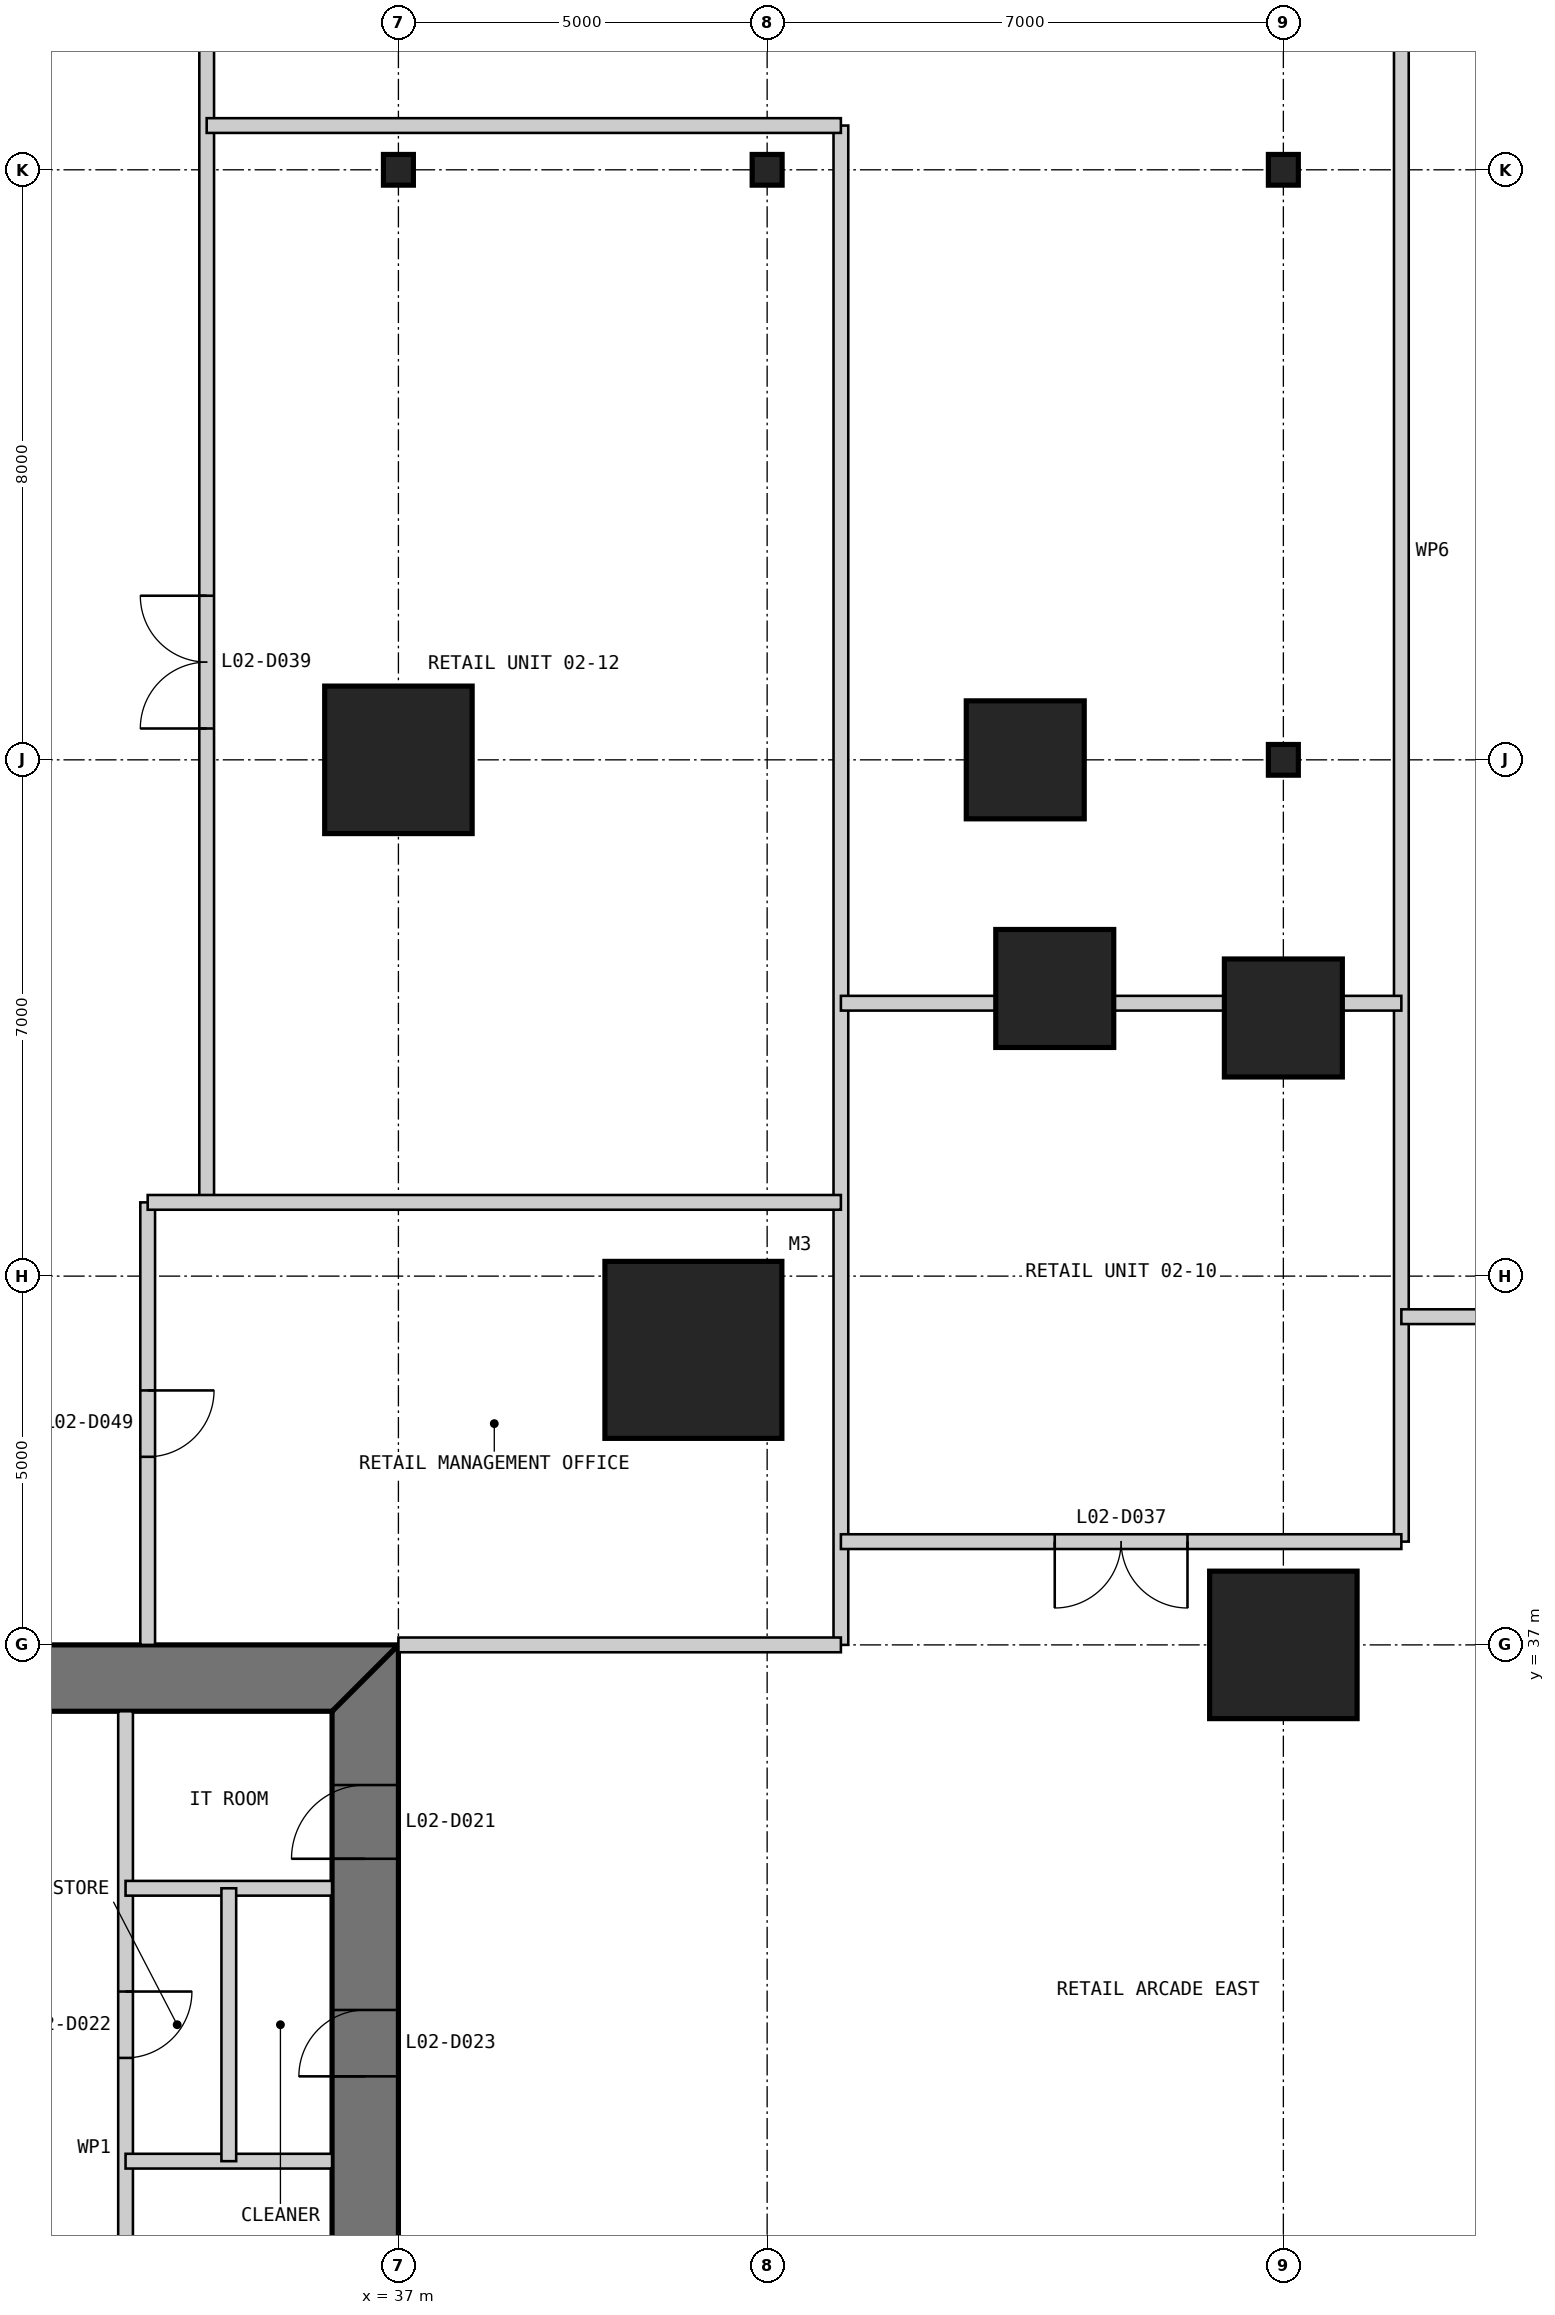
"""IFC4 building model, lengths in metres.
Left out: names, types, materials, properties, quantities, classifications, styles, units other than length and angle.
Written with IfcOpenShell. Run it as: python <this file> out.ifc"""

import sys

from ifc_helpers import new_model, si_unit, direction, frame, frame_2d, origin, origin_2d, place, context, subcontext, project, spatial, polyline, rectangle, i_section, outline, extrude, element, fill, save


model = new_model("IFC4")
c1 = context("Model", 3, precision=1e-05, world=origin(), true_north=direction((0.0, 1.0)))
c2 = subcontext(c1, "Body", "Model", "MODEL_VIEW")
j1 = project(units=[si_unit("LENGTHUNIT", "METRE"), si_unit("PLANEANGLEUNIT", "RADIAN")], contexts=[c1])
p1 = place(None, origin())
s1 = spatial("IfcSite", under=j1, at=p1, CompositionType="ELEMENT")
p2 = place(p1, origin())
s2 = spatial("IfcBuilding", under=s1, at=p2, CompositionType="ELEMENT")
p3 = place(p2, frame((0.0, 0.0, 11.8)))
s3 = spatial("IfcBuildingStorey", under=s2, at=p3, CompositionType="ELEMENT", Elevation=11.8)
p4 = place(p3, frame((41.0, 41.0, 0.0), z_axis=(0.0, 0.0, 1.0), x_axis=(1.0, 0.0, 0.0)))
e1 = element("IfcColumn", 1, at=p4, inside=s3, PredefinedType="COLUMN", context=c2, shape_type="SweptSolid", body=[
    extrude(rectangle(XDim=2.4, YDim=2.4, at=origin_2d()), origin(), (0.0, 0.0, 1.0), 4.8),
])
p5 = place(p3, frame((49.0, 37.0, 0.0), z_axis=(0.0, 0.0, 1.0), x_axis=(1.0, 0.0, 0.0)))
e2 = element("IfcColumn", 2, at=p5, inside=s3, PredefinedType="COLUMN", context=c2, shape_type="SweptSolid", body=[
    extrude(rectangle(XDim=2.0, YDim=2.0, at=origin_2d()), origin(), (0.0, 0.0, 1.0), 4.8),
])
for number, where, z_axis, x_axis in (
    (3, (49.0, 45.5, 0.0), (0.0, 0.0, 1.0), (1.0, 0.0, 0.0)),
    (4, (45.9, 45.9, 0.0), (0.0, 0.0, 1.0), (1.0, 0.0, 0.0)),
    (5, (45.5, 49.0, 0.0), (0.0, 0.0, 1.0), (1.0, 0.0, 0.0)),
):
    element("IfcColumn", number, at=place(p3, frame(where, z_axis=z_axis, x_axis=x_axis)), inside=s3, PredefinedType="COLUMN", context=c2, shape_type="SweptSolid", body=[
        extrude(rectangle(XDim=1.6, YDim=1.6, at=origin_2d()), origin(), (0.0, 0.0, 1.0), 4.8),
    ])
p6 = place(p3, frame((37.0, 49.0, 0.0), z_axis=(0.0, 0.0, 1.0), x_axis=(1.0, 0.0, 0.0)))
e6 = element("IfcColumn", 6, at=p6, inside=s3, PredefinedType="COLUMN", context=c2, shape_type="SweptSolid", body=[
    extrude(rectangle(XDim=2.0, YDim=2.0, at=origin_2d()), origin(), (0.0, 0.0, 1.0), 4.8),
])
for number, where, z_axis, x_axis in (
    (7, (37.0, 57.0, 0.0), (0.0, 0.0, 1.0), (1.0, 0.0, 0.0)),
    (8, (42.0, 57.0, 0.0), (0.0, 0.0, 1.0), (1.0, 0.0, 0.0)),
    (9, (49.0, 49.0, 0.0), (0.0, 0.0, 1.0), (1.0, 0.0, 0.0)),
    (10, (49.0, 57.0, 0.0), (0.0, 0.0, 1.0), (1.0, 0.0, 0.0)),
):
    element("IfcColumn", number, at=place(p3, frame(where, z_axis=z_axis, x_axis=x_axis)), inside=s3, PredefinedType="COLUMN", context=c2, shape_type="SweptSolid", body=[
        extrude(i_section(OverallWidth=0.406, OverallDepth=0.417, WebThickness=0.03, FlangeThickness=0.048, at=origin_2d()), origin(), (0.0, 0.0, 1.0), 4.8),
    ])
p7 = place(p3, frame((36.55, 13.9, 0.0), z_axis=(0.0, 0.0, 1.0), x_axis=(0.0, 1.0, 0.0)))
e11 = element("IfcWall", 11, at=p7, inside=s3, PredefinedType="SHEAR", context=c2, shape_type="SweptSolid", body=[
    extrude(outline(polyline([(-0.9, -0.45), (23.1, -0.45), (22.2, 0.45), (0.0, 0.45), (-0.9, -0.45)])), origin(), (0.0, 0.0, 1.0), 4.8),
])
p8 = place(p7, frame((20.2, 0.0, 0.0)))
e12 = element("IfcOpeningElement", 12, at=p8, cuts=e11, PredefinedType="OPENING", context=c2, shape_type="SweptSolid", body=[
    extrude(rectangle(XDim=1.0, YDim=2.2, at=frame_2d((0.5, 1.1))), frame((0.0, 0.46, 0.0), z_axis=(0.0, -1.0, 0.0), x_axis=(1.0, 0.0, 0.0)), (0.0, 0.0, 1.0), 0.92),
])
p9 = place(p7, frame((17.25, 0.0, 0.0)))
e13 = element("IfcOpeningElement", 13, at=p9, cuts=e11, PredefinedType="OPENING", context=c2, shape_type="SweptSolid", body=[
    extrude(rectangle(XDim=0.9, YDim=2.2, at=frame_2d((0.45, 1.1))), frame((0.0, 0.46, 0.0), z_axis=(0.0, -1.0, 0.0), x_axis=(1.0, 0.0, 0.0)), (0.0, 0.0, 1.0), 0.92),
])
p10 = place(p3, frame((37.0, 36.55, 0.0), z_axis=(0.0, 0.0, 1.0), x_axis=(-1.0, 0.0, 0.0)))
e14 = element("IfcWall", 14, at=p10, inside=s3, PredefinedType="SHEAR", context=c2, shape_type="SweptSolid", body=[
    extrude(outline(polyline([(0.0, -0.45), (24.0, -0.45), (23.1, 0.45), (0.9, 0.45), (0.0, -0.45)])), origin(), (0.0, 0.0, 1.0), 4.8),
])
p11 = place(p10, frame((4.9, 0.0, 0.0)))
e15 = element("IfcOpeningElement", 15, at=p11, cuts=e14, PredefinedType="OPENING", context=c2, shape_type="SweptSolid", body=[
    extrude(rectangle(XDim=1.0, YDim=2.2, at=frame_2d((0.5, 1.1))), frame((0.0, 0.46, 0.0), z_axis=(0.0, -1.0, 0.0), x_axis=(1.0, 0.0, 0.0)), (0.0, 0.0, 1.0), 0.92),
])
p12 = place(p10, frame((8.9, 0.0, 0.0)))
e16 = element("IfcOpeningElement", 16, at=p12, cuts=e14, PredefinedType="OPENING", context=c2, shape_type="SweptSolid", body=[
    extrude(rectangle(XDim=1.1, YDim=2.2, at=frame_2d((0.55, 1.1))), frame((0.0, 0.46, 0.0), z_axis=(0.0, -1.0, 0.0), x_axis=(1.0, 0.0, 0.0)), (0.0, 0.0, 1.0), 0.92),
])
p13 = place(p10, frame((15.05, 0.0, 0.0)))
e17 = element("IfcOpeningElement", 17, at=p13, cuts=e14, PredefinedType="OPENING", context=c2, shape_type="SweptSolid", body=[
    extrude(rectangle(XDim=0.9, YDim=2.2, at=frame_2d((0.45, 1.1))), frame((0.0, 0.46, 0.0), z_axis=(0.0, -1.0, 0.0), x_axis=(1.0, 0.0, 0.0)), (0.0, 0.0, 1.0), 0.92),
])
p14 = place(p10, frame((17.9, 0.0, 0.0)))
e18 = element("IfcOpeningElement", 18, at=p14, cuts=e14, PredefinedType="OPENING", context=c2, shape_type="SweptSolid", body=[
    extrude(rectangle(XDim=1.0, YDim=2.2, at=frame_2d((0.5, 1.1))), frame((0.0, 0.46, 0.0), z_axis=(0.0, -1.0, 0.0), x_axis=(1.0, 0.0, 0.0)), (0.0, 0.0, 1.0), 0.92),
])
p15 = place(p10, frame((21.4, 0.0, 0.0)))
e19 = element("IfcOpeningElement", 19, at=p15, cuts=e14, PredefinedType="OPENING", context=c2, shape_type="SweptSolid", body=[
    extrude(rectangle(XDim=1.0, YDim=2.2, at=frame_2d((0.5, 1.1))), frame((0.0, 0.46, 0.0), z_axis=(0.0, -1.0, 0.0), x_axis=(1.0, 0.0, 0.0)), (0.0, 0.0, 1.0), 0.92),
])
p16 = place(p3, frame((33.3, 36.1, 0.0), z_axis=(0.0, 0.0, 1.0), x_axis=(0.0, -1.0, 0.0)))
e20 = element("IfcWall", 20, at=p16, inside=s3, PredefinedType="PARTITIONING", context=c2, shape_type="SweptSolid", body=[
    extrude(rectangle(XDim=16.1, YDim=0.2, at=frame_2d((8.05, 0.0))), origin(), (0.0, 0.0, 1.0), 4.6),
])
p17 = place(p16, frame((3.8, 0.0, 0.0)))
e21 = element("IfcOpeningElement", 21, at=p17, cuts=e20, PredefinedType="OPENING", context=c2, shape_type="SweptSolid", body=[
    extrude(rectangle(XDim=0.9, YDim=2.2, at=frame_2d((0.45, 1.1))), frame((0.0, 0.11, 0.0), z_axis=(0.0, -1.0, 0.0), x_axis=(1.0, 0.0, 0.0)), (0.0, 0.0, 1.0), 0.22),
])
for number, where, z_axis, x_axis in (
    (22, (36.1, 30.0, 0.0), (0.0, 0.0, 1.0), (-1.0, 0.0, 0.0)),
    (23, (36.1, 33.7, 0.0), (0.0, 0.0, 1.0), (-1.0, 0.0, 0.0)),
):
    element("IfcWall", number, at=place(p3, frame(where, z_axis=z_axis, x_axis=x_axis)), inside=s3, PredefinedType="PARTITIONING", context=c2, shape_type="SweptSolid", body=[
        extrude(rectangle(XDim=2.8, YDim=0.2, at=frame_2d((1.4, 0.0))), origin(), (0.0, 0.0, 1.0), 4.6),
    ])
p18 = place(p3, frame((34.7, 33.7, 0.0), z_axis=(0.0, 0.0, 1.0), x_axis=(0.0, -1.0, 0.0)))
e24 = element("IfcWall", 24, at=p18, inside=s3, PredefinedType="PARTITIONING", context=c2, shape_type="SweptSolid", body=[
    extrude(rectangle(XDim=3.7, YDim=0.2, at=frame_2d((1.85, 0.0))), origin(), (0.0, 0.0, 1.0), 4.6),
])
p19 = place(p3, frame((33.6, 37.0, 0.0), z_axis=(0.0, 0.0, 1.0), x_axis=(0.0, 1.0, 0.0)))
e25 = element("IfcWall", 25, at=p19, inside=s3, PredefinedType="PARTITIONING", context=c2, shape_type="SweptSolid", body=[
    extrude(rectangle(XDim=6.0, YDim=0.2, at=frame_2d((3.0, 0.0))), origin(), (0.0, 0.0, 1.0), 4.5),
])
p20 = place(p19, frame((2.55, 0.0, 0.0)))
e26 = element("IfcOpeningElement", 26, at=p20, cuts=e25, PredefinedType="OPENING", context=c2, shape_type="SweptSolid", body=[
    extrude(rectangle(XDim=0.9, YDim=2.2, at=frame_2d((0.45, 1.1))), frame((0.0, 0.11, 0.0), z_axis=(0.0, -1.0, 0.0), x_axis=(1.0, 0.0, 0.0)), (0.0, 0.0, 1.0), 0.22),
])
p21 = place(p3, frame((34.4, 43.0, 0.0), z_axis=(0.0, 0.0, 1.0), x_axis=(0.0, 1.0, 0.0)))
e27 = element("IfcWall", 27, at=p21, inside=s3, PredefinedType="PARTITIONING", context=c2, shape_type="SweptSolid", body=[
    extrude(rectangle(XDim=22.25, YDim=0.2, at=frame_2d((11.125, 0.0))), origin(), (0.0, 0.0, 1.0), 4.5),
])
p22 = place(p21, frame((6.425, 0.0, 0.0)))
e28 = element("IfcOpeningElement", 28, at=p22, cuts=e27, PredefinedType="OPENING", context=c2, shape_type="SweptSolid", body=[
    extrude(rectangle(XDim=1.8, YDim=2.4, at=frame_2d((0.9, 1.2))), frame((0.0, 0.11, 0.0), z_axis=(0.0, -1.0, 0.0), x_axis=(1.0, 0.0, 0.0)), (0.0, 0.0, 1.0), 0.22),
])
p23 = place(p21, frame((17.5, 0.0, 0.0)))
e29 = element("IfcOpeningElement", 29, at=p23, cuts=e27, PredefinedType="OPENING", context=c2, shape_type="SweptSolid", body=[
    extrude(rectangle(XDim=1.8, YDim=2.4, at=frame_2d((0.9, 1.2))), frame((0.0, 0.11, 0.0), z_axis=(0.0, -1.0, 0.0), x_axis=(1.0, 0.0, 0.0)), (0.0, 0.0, 1.0), 0.22),
])
p24 = place(p3, frame((43.0, 37.0, 0.0), z_axis=(0.0, 0.0, 1.0), x_axis=(0.0, 1.0, 0.0)))
e30 = element("IfcWall", 30, at=p24, inside=s3, PredefinedType="PARTITIONING", context=c2, shape_type="SweptSolid", body=[
    extrude(rectangle(XDim=20.6, YDim=0.2, at=frame_2d((10.3, 0.0))), origin(), (0.0, 0.0, 1.0), 4.5),
])
p25 = place(p3, frame((50.6, 38.4, 0.0), z_axis=(0.0, 0.0, 1.0), x_axis=(0.0, 1.0, 0.0)))
e31 = element("IfcWall", 31, at=p25, inside=s3, PredefinedType="PARTITIONING", context=c2, shape_type="SweptSolid", body=[
    extrude(rectangle(XDim=26.85, YDim=0.2, at=frame_2d((13.425, 0.0))), origin(), (0.0, 0.0, 1.0), 4.5),
])
p26 = place(p3, frame((37.0, 37.0, 0.0), z_axis=(0.0, 0.0, 1.0), x_axis=(1.0, 0.0, 0.0)))
e32 = element("IfcWall", 32, at=p26, inside=s3, PredefinedType="PARTITIONING", context=c2, shape_type="SweptSolid", body=[
    extrude(rectangle(XDim=6.0, YDim=0.2, at=frame_2d((3.0, 0.0))), origin(), (0.0, 0.0, 1.0), 3.653),
])
p27 = place(p3, frame((43.0, 38.4, 0.0), z_axis=(0.0, 0.0, 1.0), x_axis=(1.0, 0.0, 0.0)))
e33 = element("IfcWall", 33, at=p27, inside=s3, PredefinedType="PARTITIONING", context=c2, shape_type="SweptSolid", body=[
    extrude(rectangle(XDim=7.6, YDim=0.2, at=frame_2d((3.8, 0.0))), origin(), (0.0, 0.0, 1.0), 4.5),
])
p28 = place(p27, frame((2.9, 0.0, 0.0)))
e34 = element("IfcOpeningElement", 34, at=p28, cuts=e33, PredefinedType="OPENING", context=c2, shape_type="SweptSolid", body=[
    extrude(rectangle(XDim=1.8, YDim=2.4, at=frame_2d((0.9, 1.2))), frame((0.0, 0.11, 0.0), z_axis=(0.0, -1.0, 0.0), x_axis=(1.0, 0.0, 0.0)), (0.0, 0.0, 1.0), 0.22),
])
p29 = place(p3, frame((50.6, 41.45, 0.0), z_axis=(0.0, 0.0, 1.0), x_axis=(1.0, 0.0, 0.0)))
e35 = element("IfcWall", 35, at=p29, inside=s3, PredefinedType="PARTITIONING", context=c2, shape_type="SweptSolid", body=[
    extrude(rectangle(XDim=6.65, YDim=0.2, at=frame_2d((3.325, 0.0))), origin(), (0.0, 0.0, 1.0), 4.5),
])
p30 = place(p29, frame((2.425, 0.0, 0.0)))
e36 = element("IfcOpeningElement", 36, at=p30, cuts=e35, PredefinedType="OPENING", context=c2, shape_type="SweptSolid", body=[
    extrude(rectangle(XDim=1.8, YDim=2.4, at=frame_2d((0.9, 1.2))), frame((0.0, 0.11, 0.0), z_axis=(0.0, -1.0, 0.0), x_axis=(1.0, 0.0, 0.0)), (0.0, 0.0, 1.0), 0.22),
])
p31 = place(p3, frame((33.6, 43.0, 0.0), z_axis=(0.0, 0.0, 1.0), x_axis=(1.0, 0.0, 0.0)))
e37 = element("IfcWall", 37, at=p31, inside=s3, PredefinedType="PARTITIONING", context=c2, shape_type="SweptSolid", body=[
    extrude(rectangle(XDim=9.4, YDim=0.2, at=frame_2d((4.7, 0.0))), origin(), (0.0, 0.0, 1.0), 4.5),
])
p32 = place(p3, frame((43.0, 45.7, 0.0), z_axis=(0.0, 0.0, 1.0), x_axis=(1.0, 0.0, 0.0)))
e38 = element("IfcWall", 38, at=p32, inside=s3, PredefinedType="PARTITIONING", context=c2, shape_type="SweptSolid", body=[
    extrude(rectangle(XDim=2.1, YDim=0.2, at=frame_2d((1.05, 0.0))), origin(), (0.0, 0.0, 1.0), 4.5),
])
p33 = place(p3, frame((46.7, 45.7, 0.0), z_axis=(0.0, 0.0, 1.0), x_axis=(1.0, 0.0, 0.0)))
e39 = element("IfcWall", 39, at=p33, inside=s3, PredefinedType="PARTITIONING", context=c2, shape_type="SweptSolid", body=[
    extrude(rectangle(XDim=1.5, YDim=0.2, at=frame_2d((0.75, 0.0))), origin(), (0.0, 0.0, 1.0), 3.65),
])
p34 = place(p3, frame((49.8, 45.7, 0.0), z_axis=(0.0, 0.0, 1.0), x_axis=(1.0, 0.0, 0.0)))
e40 = element("IfcWall", 40, at=p34, inside=s3, PredefinedType="PARTITIONING", context=c2, shape_type="SweptSolid", body=[
    extrude(rectangle(XDim=0.8, YDim=0.2, at=frame_2d((0.4, 0.0))), origin(), (0.0, 0.0, 1.0), 4.5),
])
p35 = place(p3, frame((34.4, 57.6, 0.0), z_axis=(0.0, 0.0, 1.0), x_axis=(1.0, 0.0, 0.0)))
e41 = element("IfcWall", 41, at=p35, inside=s3, PredefinedType="PARTITIONING", context=c2, shape_type="SweptSolid", body=[
    extrude(rectangle(XDim=8.6, YDim=0.2, at=frame_2d((4.3, 0.0))), origin(), (0.0, 0.0, 1.0), 4.5),
])
p36 = place(p8, origin())
e42 = element("IfcDoor", 42, at=p36, inside=s3, OperationType="SINGLE_SWING_LEFT", PredefinedType="DOOR", context=c2, shape_type="SweptSolid", body=[
    extrude(rectangle(XDim=1.0, YDim=2.2, at=frame_2d((0.5, 1.1))), frame((0.0, 0.025, 0.0), z_axis=(0.0, -1.0, 0.0), x_axis=(1.0, 0.0, 0.0)), (0.0, 0.0, 1.0), 0.05),
    extrude(outline(polyline([(0.0, 0.0), (0.04, 0.0), (0.04, 2.16), (0.96, 2.16), (0.96, 0.0), (1.0, 0.0), (1.0, 2.2), (0.0, 2.2), (0.0, 0.0)])), frame((0.0, 0.3, 0.0), z_axis=(0.0, -1.0, 0.0), x_axis=(1.0, 0.0, 0.0)), (0.0, 0.0, 1.0), 0.6),
])
fill(e12, e42)
p37 = place(p17, origin())
e43 = element("IfcDoor", 43, at=p37, inside=s3, OperationType="SINGLE_SWING_LEFT", PredefinedType="DOOR", context=c2, shape_type="SweptSolid", body=[
    extrude(rectangle(XDim=0.9, YDim=2.2, at=frame_2d((0.45, 1.1))), frame((0.0, 0.025, 0.0), z_axis=(0.0, -1.0, 0.0), x_axis=(1.0, 0.0, 0.0)), (0.0, 0.0, 1.0), 0.05),
])
fill(e21, e43)
p38 = place(p9, origin())
e44 = element("IfcDoor", 44, at=p38, inside=s3, OperationType="SINGLE_SWING_LEFT", PredefinedType="DOOR", context=c2, shape_type="SweptSolid", body=[
    extrude(rectangle(XDim=0.9, YDim=2.2, at=frame_2d((0.45, 1.1))), frame((0.0, 0.025, 0.0), z_axis=(0.0, -1.0, 0.0), x_axis=(1.0, 0.0, 0.0)), (0.0, 0.0, 1.0), 0.05),
    extrude(outline(polyline([(0.0, 0.0), (0.04, 0.0), (0.04, 2.16), (0.86, 2.16), (0.86, 0.0), (0.9, 0.0), (0.9, 2.2), (0.0, 2.2), (0.0, 0.0)])), frame((0.0, 0.3, 0.0), z_axis=(0.0, -1.0, 0.0), x_axis=(1.0, 0.0, 0.0)), (0.0, 0.0, 1.0), 0.6),
])
fill(e13, e44)
p39 = place(p28, frame((1.8, 0.0, 0.0), z_axis=(0.0, 0.0, 1.0), x_axis=(-1.0, 0.0, 0.0)))
e45 = element("IfcDoor", 45, at=p39, inside=s3, OperationType="DOUBLE_DOOR_SINGLE_SWING", PredefinedType="DOOR", context=c2, shape_type="SweptSolid", body=[
    extrude(rectangle(XDim=1.8, YDim=2.4, at=frame_2d((0.9, 1.2))), frame((0.0, 0.025, 0.0), z_axis=(0.0, -1.0, 0.0), x_axis=(1.0, 0.0, 0.0)), (0.0, 0.0, 1.0), 0.05),
])
fill(e34, e45)
p40 = place(p22, origin())
e46 = element("IfcDoor", 46, at=p40, inside=s3, OperationType="DOUBLE_DOOR_SINGLE_SWING", PredefinedType="DOOR", context=c2, shape_type="SweptSolid", body=[
    extrude(rectangle(XDim=1.8, YDim=2.4, at=frame_2d((0.9, 1.2))), frame((0.0, 0.025, 0.0), z_axis=(0.0, -1.0, 0.0), x_axis=(1.0, 0.0, 0.0)), (0.0, 0.0, 1.0), 0.05),
])
fill(e28, e46)
p41 = place(p20, frame((0.9, 0.0, 0.0), z_axis=(0.0, 0.0, 1.0), x_axis=(-1.0, 0.0, 0.0)))
e47 = element("IfcDoor", 47, at=p41, inside=s3, OperationType="SINGLE_SWING_LEFT", PredefinedType="DOOR", context=c2, shape_type="SweptSolid", body=[
    extrude(rectangle(XDim=0.9, YDim=2.2, at=frame_2d((0.45, 1.1))), frame((0.0, 0.025, 0.0), z_axis=(0.0, -1.0, 0.0), x_axis=(1.0, 0.0, 0.0)), (0.0, 0.0, 1.0), 0.05),
])
fill(e26, e47)
save(model, sys.argv[1])
